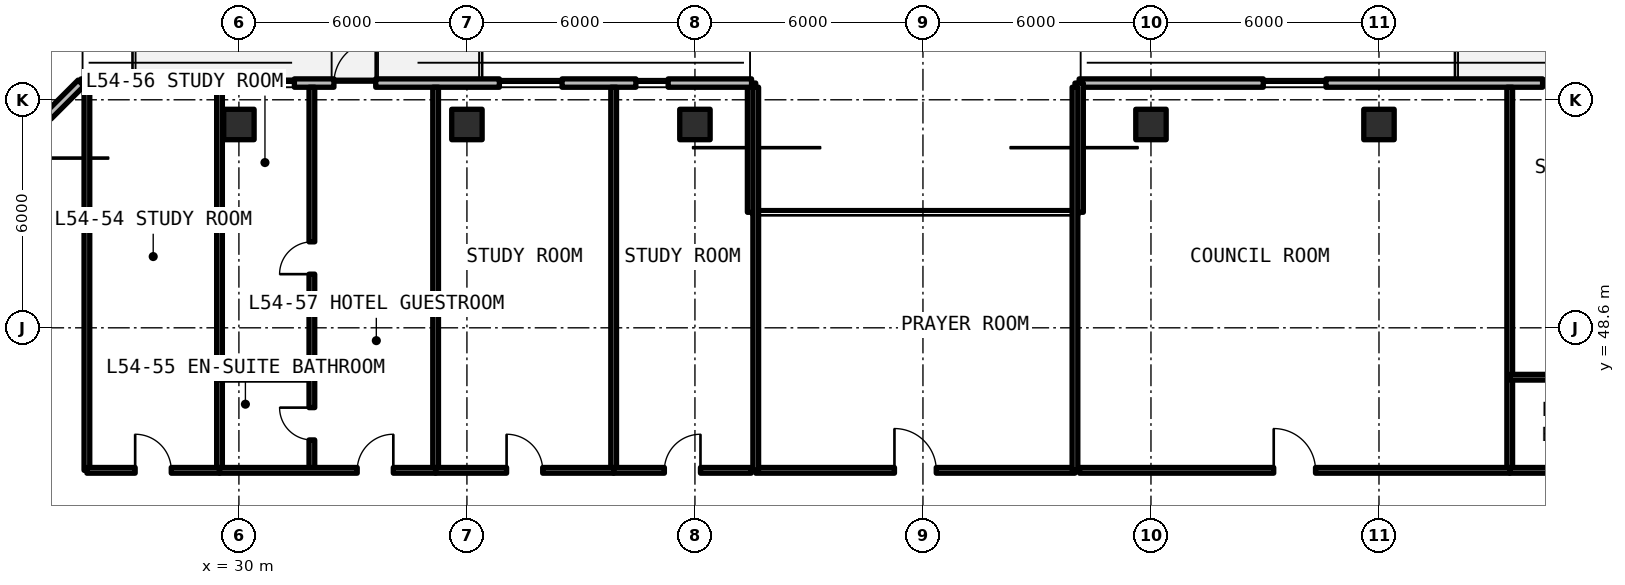
"""IFC4 building model, lengths in metres.
Left out: names, types, materials, properties, quantities, classifications, styles, units other than length and angle.
Written with IfcOpenShell. Run it as: python <this file> out.ifc"""

import sys

from ifc_helpers import new_model, si_unit, direction, frame, frame_2d, origin, origin_2d, place, context, subcontext, project, spatial, rectangle, extrude, element, fill, save


model = new_model("IFC4")
c1 = context("Model", 3, precision=1e-05, world=origin(), true_north=direction((0.0, 1.0)))
c2 = subcontext(c1, "Body", "Model", "MODEL_VIEW")
j1 = project(units=[si_unit("LENGTHUNIT", "METRE"), si_unit("PLANEANGLEUNIT", "RADIAN")], contexts=[c1])
p1 = place(None, origin())
s1 = spatial("IfcSite", under=j1, at=p1, CompositionType="ELEMENT")
p2 = place(p1, origin())
s2 = spatial("IfcBuilding", under=s1, at=p2, CompositionType="ELEMENT")
p3 = place(p2, frame((0.0, 0.0, 195.03)))
s3 = spatial("IfcBuildingStorey", under=s2, at=p3, CompositionType="ELEMENT", Elevation=195.03)
for number, where, z_axis, x_axis in (
    (1, (30.0, 53.95, 0.0), (0.0, 0.0, 1.0), (1.0, 0.0, 0.0)),
    (2, (36.0, 53.95, 0.0), (0.0, 0.0, 1.0), (1.0, 0.0, 0.0)),
    (3, (42.0, 53.95, 0.0), (0.0, 0.0, 1.0), (1.0, 0.0, 0.0)),
    (4, (54.0, 53.95, 0.0), (0.0, 0.0, 1.0), (1.0, 0.0, 0.0)),
    (5, (60.0, 53.95, 0.0), (0.0, 0.0, 1.0), (1.0, 0.0, 0.0)),
):
    element("IfcColumn", number, at=place(p3, frame(where, z_axis=z_axis, x_axis=x_axis)), inside=s3, PredefinedType="COLUMN", context=c2, shape_type="SweptSolid", body=[
        extrude(rectangle(XDim=0.8, YDim=0.8, at=origin_2d()), origin(), (0.0, 0.0, 1.0), 3.3),
    ])
p4 = place(p3, frame((95.354, 55.04, 0.0), z_axis=(0.0, 0.0, 1.0), x_axis=(-1.0, 0.0, 0.0)))
e6 = element("IfcWall", 6, at=p4, inside=s3, PredefinedType="SOLIDWALL", context=c2, shape_type="SweptSolid", body=[
    extrude(rectangle(XDim=43.244, YDim=0.22, at=frame_2d((21.622, 0.0))), origin(), (0.0, 0.0, 1.0), 3.08),
])
p5 = place(p4, frame((25.704, 0.0, 0.0)))
e7 = element("IfcOpeningElement", 7, at=p5, cuts=e6, PredefinedType="OPENING", context=c2, shape_type="SweptSolid", body=[
    extrude(rectangle(XDim=1.1, YDim=2.15, at=frame_2d((0.55, 1.075))), frame((0.0, 0.12, 0.0), z_axis=(0.0, -1.0, 0.0), x_axis=(1.0, 0.0, 0.0)), (0.0, 0.0, 1.0), 0.24),
])
p6 = place(p4, frame((19.104, 0.0, 0.0)))
e8 = element("IfcOpeningElement", 8, at=p6, cuts=e6, PredefinedType="OPENING", context=c2, shape_type="SweptSolid", body=[
    extrude(rectangle(XDim=1.1, YDim=2.15, at=frame_2d((0.55, 1.075))), frame((0.0, 0.12, 0.0), z_axis=(0.0, -1.0, 0.0), x_axis=(1.0, 0.0, 0.0)), (0.0, 0.0, 1.0), 0.24),
])
p7 = place(p4, frame((36.749, 0.0, 0.78)))
e9 = element("IfcOpeningElement", 9, at=p7, cuts=e6, PredefinedType="OPENING", context=c2, shape_type="SweptSolid", body=[
    extrude(rectangle(XDim=1.65, YDim=1.66, at=frame_2d((0.825, 0.83))), frame((0.0, 0.12, 0.0), z_axis=(0.0, -1.0, 0.0), x_axis=(1.0, 0.0, 0.0)), (0.0, 0.0, 1.0), 0.24),
])
p8 = place(p4, frame((30.199, 0.0, 0.78)))
e10 = element("IfcOpeningElement", 10, at=p8, cuts=e6, PredefinedType="OPENING", context=c2, shape_type="SweptSolid", body=[
    extrude(rectangle(XDim=0.85, YDim=1.65, at=frame_2d((0.425, 0.825))), frame((0.0, 0.12, 0.0), z_axis=(0.0, -1.0, 0.0), x_axis=(1.0, 0.0, 0.0)), (0.0, 0.0, 1.0), 0.24),
])
p9 = place(p4, frame((8.918, 0.0, 0.78)))
e11 = element("IfcOpeningElement", 11, at=p9, cuts=e6, PredefinedType="OPENING", context=c2, shape_type="SweptSolid", body=[
    extrude(rectangle(XDim=1.65, YDim=1.66, at=frame_2d((0.825, 0.83))), frame((0.0, 0.12, 0.0), z_axis=(0.0, -1.0, 0.0), x_axis=(1.0, 0.0, 0.0)), (0.0, 0.0, 1.0), 0.24),
])
p10 = place(p4, frame((2.66, 0.0, 0.78)))
e12 = element("IfcOpeningElement", 12, at=p10, cuts=e6, PredefinedType="OPENING", context=c2, shape_type="SweptSolid", body=[
    extrude(rectangle(XDim=1.65, YDim=1.66, at=frame_2d((0.825, 0.83))), frame((0.0, 0.12, 0.0), z_axis=(0.0, -1.0, 0.0), x_axis=(1.0, 0.0, 0.0)), (0.0, 0.0, 1.0), 0.24),
])
for number, where, z_axis, x_axis in (
    (13, (52.11, 55.04, 0.0), (0.0, 0.0, 1.0), (0.0, -1.0, 0.0)),
    (14, (43.49, 51.64, 0.0), (0.0, 0.0, 1.0), (0.0, 1.0, 0.0)),
):
    element("IfcWall", number, at=place(p3, frame(where, z_axis=z_axis, x_axis=x_axis)), inside=s3, PredefinedType="SOLIDWALL", context=c2, shape_type="SweptSolid", body=[
        extrude(rectangle(XDim=3.4, YDim=0.22, at=frame_2d((1.7, 0.0))), origin(), (0.0, 0.0, 1.0), 3.08),
    ])
p11 = place(p3, frame((43.49, 55.04, 0.0), z_axis=(0.0, 0.0, 1.0), x_axis=(-1.0, 0.0, 0.0)))
e15 = element("IfcWall", 15, at=p11, inside=s3, PredefinedType="SOLIDWALL", context=c2, shape_type="SweptSolid", body=[
    extrude(rectangle(XDim=17.644, YDim=0.22, at=frame_2d((8.822, 0.0))), origin(), (0.0, 0.0, 1.0), 3.08),
])
p12 = place(p11, frame((9.89, 0.0, 0.0)))
e16 = element("IfcOpeningElement", 16, at=p12, cuts=e15, PredefinedType="OPENING", context=c2, shape_type="SweptSolid", body=[
    extrude(rectangle(XDim=1.1, YDim=2.15, at=frame_2d((0.55, 1.075))), frame((0.0, 0.12, 0.0), z_axis=(0.0, -1.0, 0.0), x_axis=(1.0, 0.0, 0.0)), (0.0, 0.0, 1.0), 0.24),
])
p13 = place(p11, frame((14.92, 0.0, 0.78)))
e17 = element("IfcOpeningElement", 17, at=p13, cuts=e15, PredefinedType="OPENING", context=c2, shape_type="SweptSolid", body=[
    extrude(rectangle(XDim=1.65, YDim=1.66, at=frame_2d((0.825, 0.83))), frame((0.0, 0.12, 0.0), z_axis=(0.0, -1.0, 0.0), x_axis=(1.0, 0.0, 0.0)), (0.0, 0.0, 1.0), 0.24),
])
p14 = place(p11, frame((12.03, 0.0, 0.78)))
e18 = element("IfcOpeningElement", 18, at=p14, cuts=e15, PredefinedType="OPENING", context=c2, shape_type="SweptSolid", body=[
    extrude(rectangle(XDim=0.85, YDim=1.65, at=frame_2d((0.425, 0.825))), frame((0.0, 0.12, 0.0), z_axis=(0.0, -1.0, 0.0), x_axis=(1.0, 0.0, 0.0)), (0.0, 0.0, 1.0), 0.24),
])
p15 = place(p11, frame((4.986, 0.0, 0.78)))
e19 = element("IfcOpeningElement", 19, at=p15, cuts=e15, PredefinedType="OPENING", context=c2, shape_type="SweptSolid", body=[
    extrude(rectangle(XDim=1.65, YDim=1.66, at=frame_2d((0.825, 0.83))), frame((0.0, 0.12, 0.0), z_axis=(0.0, -1.0, 0.0), x_axis=(1.0, 0.0, 0.0)), (0.0, 0.0, 1.0), 0.24),
])
p16 = place(p11, frame((2.194, 0.0, 0.78)))
e20 = element("IfcOpeningElement", 20, at=p16, cuts=e15, PredefinedType="OPENING", context=c2, shape_type="SweptSolid", body=[
    extrude(rectangle(XDim=0.85, YDim=1.65, at=frame_2d((0.425, 0.825))), frame((0.0, 0.12, 0.0), z_axis=(0.0, -1.0, 0.0), x_axis=(1.0, 0.0, 0.0)), (0.0, 0.0, 1.0), 0.24),
])
p17 = place(p3, frame((25.846, 55.04, 0.0), z_axis=(0.0, 0.0, 1.0), x_axis=(-0.707106781187, -0.707106781187, 0.0)))
e21 = element("IfcWall", 21, at=p17, inside=s3, PredefinedType="SOLIDWALL", context=c2, shape_type="SweptSolid", body=[
    extrude(rectangle(XDim=5.849, YDim=0.22, at=frame_2d((2.924, 0.0))), origin(), (0.0, 0.0, 1.0), 3.08),
])
p18 = place(p17, frame((1.224, 0.0, 0.78)))
e22 = element("IfcOpeningElement", 22, at=p18, cuts=e21, PredefinedType="OPENING", context=c2, shape_type="SweptSolid", body=[
    extrude(rectangle(XDim=3.4, YDim=1.66, at=frame_2d((1.7, 0.83))), frame((0.0, 0.12, 0.0), z_axis=(0.0, -1.0, 0.0), x_axis=(1.0, 0.0, 0.0)), (0.0, 0.0, 1.0), 0.24),
])
p19 = place(p3, frame((43.6, 44.85, 0.0), z_axis=(0.0, 0.0, 1.0), x_axis=(1.0, 0.0, 0.0)))
e23 = element("IfcWall", 23, at=p19, inside=s3, PredefinedType="SOLIDWALL", context=c2, shape_type="SweptSolid", body=[
    extrude(rectangle(XDim=8.4, YDim=0.15, at=frame_2d((4.2, 0.0))), origin(), (0.0, 0.0, 1.0), 2.35),
])
p20 = place(p19, frame((3.65, 0.0, 0.0)))
e24 = element("IfcOpeningElement", 24, at=p20, cuts=e23, PredefinedType="OPENING", context=c2, shape_type="SweptSolid", body=[
    extrude(rectangle(XDim=1.1, YDim=2.15, at=frame_2d((0.55, 1.075))), frame((0.0, 0.085, 0.0), z_axis=(0.0, -1.0, 0.0), x_axis=(1.0, 0.0, 0.0)), (0.0, 0.0, 1.0), 0.17),
])
for number, where, z_axis, x_axis in (
    (25, (43.6, 44.85, 0.0), (0.0, 0.0, 1.0), (0.0, 1.0, 0.0)),
    (26, (52.0, 44.85, 0.0), (0.0, 0.0, 1.0), (0.0, 1.0, 0.0)),
    (27, (26.0, 44.85, 0.0), (0.0, 0.0, 1.0), (0.0, 1.0, 0.0)),
    (28, (29.49, 44.85, 0.0), (0.0, 0.0, 1.0), (0.0, 1.0, 0.0)),
):
    element("IfcWall", number, at=place(p3, frame(where, z_axis=z_axis, x_axis=x_axis)), inside=s3, PredefinedType="SOLIDWALL", context=c2, shape_type="SweptSolid", body=[
        extrude(rectangle(XDim=10.08, YDim=0.15, at=frame_2d((5.04, 0.0))), origin(), (0.0, 0.0, 1.0), 2.35),
    ])
p21 = place(p3, frame((26.0, 44.85, 0.0), z_axis=(0.0, 0.0, 1.0), x_axis=(1.0, 0.0, 0.0)))
e29 = element("IfcWall", 29, at=p21, inside=s3, PredefinedType="SOLIDWALL", context=c2, shape_type="SweptSolid", body=[
    extrude(rectangle(XDim=3.49, YDim=0.15, at=frame_2d((1.745, 0.0))), origin(), (0.0, 0.0, 1.0), 2.35),
])
p22 = place(p21, frame((1.27, 0.0, 0.0)))
e30 = element("IfcOpeningElement", 30, at=p22, cuts=e29, PredefinedType="OPENING", context=c2, shape_type="SweptSolid", body=[
    extrude(rectangle(XDim=0.95, YDim=2.15, at=frame_2d((0.475, 1.075))), frame((0.0, 0.085, 0.0), z_axis=(0.0, -1.0, 0.0), x_axis=(1.0, 0.0, 0.0)), (0.0, 0.0, 1.0), 0.17),
])
p23 = place(p3, frame((35.176, 44.85, 0.0), z_axis=(0.0, 0.0, 1.0), x_axis=(0.0, 1.0, 0.0)))
e31 = element("IfcWall", 31, at=p23, inside=s3, PredefinedType="SOLIDWALL", context=c2, shape_type="SweptSolid", body=[
    extrude(rectangle(XDim=10.08, YDim=0.15, at=frame_2d((5.04, 0.0))), origin(), (0.0, 0.0, 1.0), 2.35),
])
p24 = place(p3, frame((29.49, 47.3, 0.0), z_axis=(0.0, 0.0, 1.0), x_axis=(1.0, 0.0, 0.0)))
e32 = element("IfcWall", 32, at=p24, inside=s3, PredefinedType="PARTITIONING", context=c2, shape_type="SweptSolid", body=[
    extrude(rectangle(XDim=2.43, YDim=0.15, at=frame_2d((1.215, 0.0))), origin(), (0.0, 0.0, 1.0), 2.35),
])
p25 = place(p3, frame((31.92, 44.85, 0.0), z_axis=(0.0, 0.0, 1.0), x_axis=(0.0, 1.0, 0.0)))
e33 = element("IfcWall", 33, at=p25, inside=s3, PredefinedType="PARTITIONING", context=c2, shape_type="SweptSolid", body=[
    extrude(rectangle(XDim=10.08, YDim=0.15, at=frame_2d((5.04, 0.0))), origin(), (0.0, 0.0, 1.0), 2.35),
])
p26 = place(p25, frame((0.8, 0.0, 0.0)))
e34 = element("IfcOpeningElement", 34, at=p26, cuts=e33, PredefinedType="OPENING", context=c2, shape_type="SweptSolid", body=[
    extrude(rectangle(XDim=0.85, YDim=2.1, at=frame_2d((0.425, 1.05))), frame((0.0, 0.085, 0.0), z_axis=(0.0, -1.0, 0.0), x_axis=(1.0, 0.0, 0.0)), (0.0, 0.0, 1.0), 0.17),
])
p27 = place(p25, frame((5.162, 0.0, 0.0)))
e35 = element("IfcOpeningElement", 35, at=p27, cuts=e33, PredefinedType="OPENING", context=c2, shape_type="SweptSolid", body=[
    extrude(rectangle(XDim=0.85, YDim=2.1, at=frame_2d((0.425, 1.05))), frame((0.0, 0.085, 0.0), z_axis=(0.0, -1.0, 0.0), x_axis=(1.0, 0.0, 0.0)), (0.0, 0.0, 1.0), 0.17),
])
p28 = place(p3, frame((29.49, 44.85, 0.0), z_axis=(0.0, 0.0, 1.0), x_axis=(1.0, 0.0, 0.0)))
e36 = element("IfcWall", 36, at=p28, inside=s3, PredefinedType="SOLIDWALL", context=c2, shape_type="SweptSolid", body=[
    extrude(rectangle(XDim=5.687, YDim=0.15, at=frame_2d((2.843, 0.0))), origin(), (0.0, 0.0, 1.0), 2.35),
])
p29 = place(p28, frame((3.624, 0.0, 0.0)))
e37 = element("IfcOpeningElement", 37, at=p29, cuts=e36, PredefinedType="OPENING", context=c2, shape_type="SweptSolid", body=[
    extrude(rectangle(XDim=0.95, YDim=2.15, at=frame_2d((0.475, 1.075))), frame((0.0, 0.085, 0.0), z_axis=(0.0, -1.0, 0.0), x_axis=(1.0, 0.0, 0.0)), (0.0, 0.0, 1.0), 0.17),
])
p30 = place(p3, frame((39.861, 44.85, 0.0), z_axis=(0.0, 0.0, 1.0), x_axis=(0.0, 1.0, 0.0)))
e38 = element("IfcWall", 38, at=p30, inside=s3, PredefinedType="SOLIDWALL", context=c2, shape_type="SweptSolid", body=[
    extrude(rectangle(XDim=10.08, YDim=0.15, at=frame_2d((5.04, 0.0))), origin(), (0.0, 0.0, 1.0), 2.35),
])
p31 = place(p3, frame((35.176, 44.85, 0.0), z_axis=(0.0, 0.0, 1.0), x_axis=(1.0, 0.0, 0.0)))
e39 = element("IfcWall", 39, at=p31, inside=s3, PredefinedType="SOLIDWALL", context=c2, shape_type="SweptSolid", body=[
    extrude(rectangle(XDim=4.685, YDim=0.15, at=frame_2d((2.342, 0.0))), origin(), (0.0, 0.0, 1.0), 2.35),
])
p32 = place(p31, frame((1.867, 0.0, 0.0)))
e40 = element("IfcOpeningElement", 40, at=p32, cuts=e39, PredefinedType="OPENING", context=c2, shape_type="SweptSolid", body=[
    extrude(rectangle(XDim=0.95, YDim=2.15, at=frame_2d((0.475, 1.075))), frame((0.0, 0.085, 0.0), z_axis=(0.0, -1.0, 0.0), x_axis=(1.0, 0.0, 0.0)), (0.0, 0.0, 1.0), 0.17),
])
p33 = place(p3, frame((39.861, 44.85, 0.0), z_axis=(0.0, 0.0, 1.0), x_axis=(1.0, 0.0, 0.0)))
e41 = element("IfcWall", 41, at=p33, inside=s3, PredefinedType="SOLIDWALL", context=c2, shape_type="SweptSolid", body=[
    extrude(rectangle(XDim=3.619, YDim=0.15, at=frame_2d((1.81, 0.0))), origin(), (0.0, 0.0, 1.0), 2.35),
])
p34 = place(p33, frame((1.334, 0.0, 0.0)))
e42 = element("IfcOpeningElement", 42, at=p34, cuts=e41, PredefinedType="OPENING", context=c2, shape_type="SweptSolid", body=[
    extrude(rectangle(XDim=0.95, YDim=2.15, at=frame_2d((0.475, 1.075))), frame((0.0, 0.085, 0.0), z_axis=(0.0, -1.0, 0.0), x_axis=(1.0, 0.0, 0.0)), (0.0, 0.0, 1.0), 0.17),
])
p35 = place(p3, frame((63.44, 44.85, 0.0), z_axis=(0.0, 0.0, 1.0), x_axis=(0.0, 1.0, 0.0)))
e43 = element("IfcWall", 43, at=p35, inside=s3, PredefinedType="SOLIDWALL", context=c2, shape_type="SweptSolid", body=[
    extrude(rectangle(XDim=10.08, YDim=0.15, at=frame_2d((5.04, 0.0))), origin(), (0.0, 0.0, 1.0), 2.35),
])
p36 = place(p3, frame((52.12, 44.85, 0.0), z_axis=(0.0, 0.0, 1.0), x_axis=(1.0, 0.0, 0.0)))
e44 = element("IfcWall", 44, at=p36, inside=s3, PredefinedType="SOLIDWALL", context=c2, shape_type="SweptSolid", body=[
    extrude(rectangle(XDim=11.32, YDim=0.15, at=frame_2d((5.66, 0.0))), origin(), (0.0, 0.0, 1.0), 2.35),
])
p37 = place(p36, frame((5.11, 0.0, 0.0)))
e45 = element("IfcOpeningElement", 45, at=p37, cuts=e44, PredefinedType="OPENING", context=c2, shape_type="SweptSolid", body=[
    extrude(rectangle(XDim=1.1, YDim=2.15, at=frame_2d((0.55, 1.075))), frame((0.0, 0.085, 0.0), z_axis=(0.0, -1.0, 0.0), x_axis=(1.0, 0.0, 0.0)), (0.0, 0.0, 1.0), 0.17),
])
p38 = place(p3, frame((63.44, 47.3, 0.0), z_axis=(0.0, 0.0, 1.0), x_axis=(1.0, 0.0, 0.0)))
e46 = element("IfcWall", 46, at=p38, inside=s3, PredefinedType="PARTITIONING", context=c2, shape_type="SweptSolid", body=[
    extrude(rectangle(XDim=4.48, YDim=0.15, at=frame_2d((2.24, 0.0))), origin(), (0.0, 0.0, 1.0), 2.35),
])
p39 = place(p3, frame((63.44, 44.85, 0.0), z_axis=(0.0, 0.0, 1.0), x_axis=(1.0, 0.0, 0.0)))
e47 = element("IfcWall", 47, at=p39, inside=s3, PredefinedType="SOLIDWALL", context=c2, shape_type="SweptSolid", body=[
    extrude(rectangle(XDim=9.119, YDim=0.15, at=frame_2d((4.56, 0.0))), origin(), (0.0, 0.0, 1.0), 2.35),
])
p40 = place(p39, frame((6.365, 0.0, 0.0)))
e48 = element("IfcOpeningElement", 48, at=p40, cuts=e47, PredefinedType="OPENING", context=c2, shape_type="SweptSolid", body=[
    extrude(rectangle(XDim=0.95, YDim=2.15, at=frame_2d((0.475, 1.075))), frame((0.0, 0.085, 0.0), z_axis=(0.0, -1.0, 0.0), x_axis=(1.0, 0.0, 0.0)), (0.0, 0.0, 1.0), 0.17),
])
p41 = place(p7, origin())
e49 = element("IfcWindow", 49, at=p41, inside=s3, PartitioningType="SINGLE_PANEL", PredefinedType="WINDOW", context=c2, shape_type="SweptSolid", body=[
    extrude(rectangle(XDim=1.65, YDim=1.66, at=frame_2d((0.825, 0.83))), frame((0.0, 0.03, 0.0), z_axis=(0.0, -1.0, 0.0), x_axis=(1.0, 0.0, 0.0)), (0.0, 0.0, 1.0), 0.06),
])
fill(e9, e49)
p42 = place(p8, origin())
e50 = element("IfcWindow", 50, at=p42, inside=s3, PartitioningType="SINGLE_PANEL", PredefinedType="WINDOW", context=c2, shape_type="SweptSolid", body=[
    extrude(rectangle(XDim=0.85, YDim=1.65, at=frame_2d((0.425, 0.825))), frame((0.0, 0.03, 0.0), z_axis=(0.0, -1.0, 0.0), x_axis=(1.0, 0.0, 0.0)), (0.0, 0.0, 1.0), 0.06),
])
fill(e10, e50)
p43 = place(p12, frame((1.1, 0.0, 0.0), z_axis=(0.0, 0.0, 1.0), x_axis=(-1.0, 0.0, 0.0)))
e51 = element("IfcDoor", 51, at=p43, inside=s3, OperationType="SINGLE_SWING_LEFT", PredefinedType="DOOR", context=c2, shape_type="SweptSolid", body=[
    extrude(rectangle(XDim=1.1, YDim=2.15, at=frame_2d((0.55, 1.075))), frame((0.0, 0.025, 0.0), z_axis=(0.0, -1.0, 0.0), x_axis=(1.0, 0.0, 0.0)), (0.0, 0.0, 1.0), 0.05),
])
fill(e16, e51)
p44 = place(p13, origin())
e52 = element("IfcWindow", 52, at=p44, inside=s3, PartitioningType="SINGLE_PANEL", PredefinedType="WINDOW", context=c2, shape_type="SweptSolid", body=[
    extrude(rectangle(XDim=1.65, YDim=1.66, at=frame_2d((0.825, 0.83))), frame((0.0, 0.03, 0.0), z_axis=(0.0, -1.0, 0.0), x_axis=(1.0, 0.0, 0.0)), (0.0, 0.0, 1.0), 0.06),
])
fill(e17, e52)
p45 = place(p14, origin())
e53 = element("IfcWindow", 53, at=p45, inside=s3, PartitioningType="SINGLE_PANEL", PredefinedType="WINDOW", context=c2, shape_type="SweptSolid", body=[
    extrude(rectangle(XDim=0.85, YDim=1.65, at=frame_2d((0.425, 0.825))), frame((0.0, 0.03, 0.0), z_axis=(0.0, -1.0, 0.0), x_axis=(1.0, 0.0, 0.0)), (0.0, 0.0, 1.0), 0.06),
])
fill(e18, e53)
p46 = place(p15, origin())
e54 = element("IfcWindow", 54, at=p46, inside=s3, PartitioningType="SINGLE_PANEL", PredefinedType="WINDOW", context=c2, shape_type="SweptSolid", body=[
    extrude(rectangle(XDim=1.65, YDim=1.66, at=frame_2d((0.825, 0.83))), frame((0.0, 0.03, 0.0), z_axis=(0.0, -1.0, 0.0), x_axis=(1.0, 0.0, 0.0)), (0.0, 0.0, 1.0), 0.06),
])
fill(e19, e54)
p47 = place(p16, origin())
e55 = element("IfcWindow", 55, at=p47, inside=s3, PartitioningType="SINGLE_PANEL", PredefinedType="WINDOW", context=c2, shape_type="SweptSolid", body=[
    extrude(rectangle(XDim=0.85, YDim=1.65, at=frame_2d((0.425, 0.825))), frame((0.0, 0.03, 0.0), z_axis=(0.0, -1.0, 0.0), x_axis=(1.0, 0.0, 0.0)), (0.0, 0.0, 1.0), 0.06),
])
fill(e20, e55)
p48 = place(p20, origin())
e56 = element("IfcDoor", 56, at=p48, inside=s3, OperationType="SINGLE_SWING_LEFT", PredefinedType="DOOR", context=c2, shape_type="SweptSolid", body=[
    extrude(rectangle(XDim=1.1, YDim=2.15, at=frame_2d((0.55, 1.075))), frame((0.0, 0.025, 0.0), z_axis=(0.0, -1.0, 0.0), x_axis=(1.0, 0.0, 0.0)), (0.0, 0.0, 1.0), 0.05),
])
fill(e24, e56)
p49 = place(p22, origin())
e57 = element("IfcDoor", 57, at=p49, inside=s3, OperationType="SINGLE_SWING_LEFT", PredefinedType="DOOR", context=c2, shape_type="SweptSolid", body=[
    extrude(rectangle(XDim=0.95, YDim=2.15, at=frame_2d((0.475, 1.075))), frame((0.0, 0.025, 0.0), z_axis=(0.0, -1.0, 0.0), x_axis=(1.0, 0.0, 0.0)), (0.0, 0.0, 1.0), 0.05),
])
fill(e30, e57)
p50 = place(p26, origin())
e58 = element("IfcDoor", 58, at=p50, inside=s3, OperationType="SINGLE_SWING_RIGHT", PredefinedType="DOOR", context=c2, shape_type="SweptSolid", body=[
    extrude(rectangle(XDim=0.85, YDim=2.1, at=frame_2d((0.425, 1.05))), frame((0.0, 0.025, 0.0), z_axis=(0.0, -1.0, 0.0), x_axis=(1.0, 0.0, 0.0)), (0.0, 0.0, 1.0), 0.05),
])
fill(e34, e58)
p51 = place(p27, origin())
e59 = element("IfcDoor", 59, at=p51, inside=s3, OperationType="SINGLE_SWING_LEFT", PredefinedType="DOOR", context=c2, shape_type="SweptSolid", body=[
    extrude(rectangle(XDim=0.85, YDim=2.1, at=frame_2d((0.425, 1.05))), frame((0.0, 0.025, 0.0), z_axis=(0.0, -1.0, 0.0), x_axis=(1.0, 0.0, 0.0)), (0.0, 0.0, 1.0), 0.05),
])
fill(e35, e59)
p52 = place(p29, origin())
e60 = element("IfcDoor", 60, at=p52, inside=s3, OperationType="SINGLE_SWING_RIGHT", PredefinedType="DOOR", context=c2, shape_type="SweptSolid", body=[
    extrude(rectangle(XDim=0.95, YDim=2.15, at=frame_2d((0.475, 1.075))), frame((0.0, 0.025, 0.0), z_axis=(0.0, -1.0, 0.0), x_axis=(1.0, 0.0, 0.0)), (0.0, 0.0, 1.0), 0.05),
])
fill(e37, e60)
p53 = place(p32, origin())
e61 = element("IfcDoor", 61, at=p53, inside=s3, OperationType="SINGLE_SWING_LEFT", PredefinedType="DOOR", context=c2, shape_type="SweptSolid", body=[
    extrude(rectangle(XDim=0.95, YDim=2.15, at=frame_2d((0.475, 1.075))), frame((0.0, 0.025, 0.0), z_axis=(0.0, -1.0, 0.0), x_axis=(1.0, 0.0, 0.0)), (0.0, 0.0, 1.0), 0.05),
])
fill(e40, e61)
p54 = place(p34, origin())
e62 = element("IfcDoor", 62, at=p54, inside=s3, OperationType="SINGLE_SWING_RIGHT", PredefinedType="DOOR", context=c2, shape_type="SweptSolid", body=[
    extrude(rectangle(XDim=0.95, YDim=2.15, at=frame_2d((0.475, 1.075))), frame((0.0, 0.025, 0.0), z_axis=(0.0, -1.0, 0.0), x_axis=(1.0, 0.0, 0.0)), (0.0, 0.0, 1.0), 0.05),
])
fill(e42, e62)
p55 = place(p37, origin())
e63 = element("IfcDoor", 63, at=p55, inside=s3, OperationType="SINGLE_SWING_LEFT", PredefinedType="DOOR", context=c2, shape_type="SweptSolid", body=[
    extrude(rectangle(XDim=1.1, YDim=2.15, at=frame_2d((0.55, 1.075))), frame((0.0, 0.025, 0.0), z_axis=(0.0, -1.0, 0.0), x_axis=(1.0, 0.0, 0.0)), (0.0, 0.0, 1.0), 0.05),
])
fill(e45, e63)
save(model, sys.argv[1])
